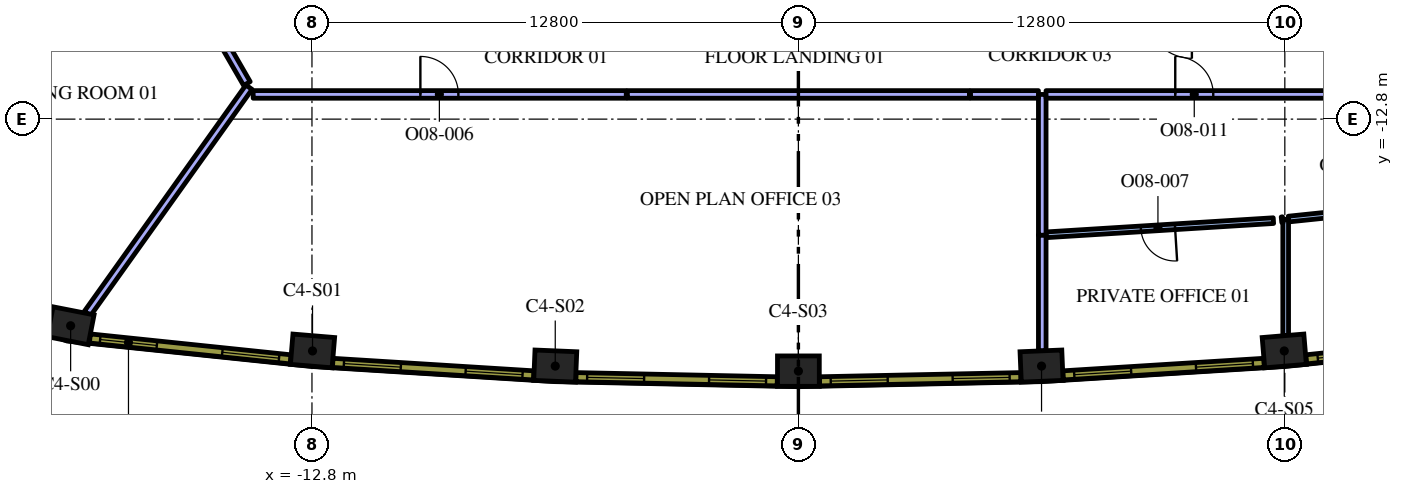
"""IFC4 building model, lengths in metres.
Left out: names, types, materials, properties, quantities, classifications, styles, units other than length and angle.
Written with IfcOpenShell. Run it as: python <this file> out.ifc"""

import sys

from ifc_helpers import new_model, si_unit, direction, frame, frame_2d, origin, origin_2d, place, context, subcontext, project, spatial, rectangle, extrude, element, fill, save


model = new_model("IFC4")
c1 = context("Model", 3, precision=1e-05, world=origin(), true_north=direction((0.0, 1.0)))
c2 = subcontext(c1, "Body", "Model", "MODEL_VIEW")
j1 = project(units=[si_unit("LENGTHUNIT", "METRE"), si_unit("PLANEANGLEUNIT", "RADIAN")], contexts=[c1])
p1 = place(None, origin())
s1 = spatial("IfcSite", under=j1, at=p1, CompositionType="ELEMENT")
p2 = place(p1, origin())
s2 = spatial("IfcBuilding", under=s1, at=p2, CompositionType="ELEMENT")
p3 = place(p2, frame((0.0, 0.0, 226.8)))
s3 = spatial("IfcBuildingStorey", under=s2, at=p3, CompositionType="ELEMENT", Elevation=226.8)
for number, where, z_axis, x_axis in (
    (1, (-19.15, -18.237, 0.0), (0.0, 0.0, 1.0), (0.981, -0.192, 0.0)),
    (2, (-12.785, -18.9, 0.0), (0.0, 0.0, 1.0), (0.997, -0.083, 0.0)),
    (3, (-6.398, -19.298, 0.0), (0.0, 0.0, 1.0), (0.999, -0.041, 0.0)),
    (4, (0.0, -19.431, 0.0), (0.0, 0.0, 1.0), (1.0, 0.0, 0.0)),
    (5, (6.398, -19.298, 0.0), (0.0, 0.0, 1.0), (0.999, 0.041, 0.0)),
    (6, (12.785, -18.9, 0.0), (0.0, 0.0, 1.0), (0.997, 0.083, 0.0)),
):
    element("IfcColumn", number, at=place(p3, frame(where, z_axis=z_axis, x_axis=x_axis)), inside=s3, PredefinedType="COLUMN", context=c2, shape_type="SweptSolid", body=[
        extrude(rectangle(XDim=1.1, YDim=0.8, at=origin_2d()), origin(), (0.0, 0.0, 1.0), 4.2),
    ])
p4 = place(p3, frame((-14.457, -11.96, 0.0), z_axis=(0.0, 0.0, 1.0), x_axis=(-0.581023578026, -0.813886725397, 0.0)))
e7 = element("IfcWall", 7, at=p4, inside=s3, PredefinedType="PARTITIONING", context=c2, shape_type="SweptSolid", body=[
    extrude(rectangle(XDim=7.318, YDim=0.2, at=frame_2d((3.659, 0.0))), origin(), (0.0, 0.0, 1.0), 3.45),
])
p5 = place(p3, frame((-17.531, -6.635, 0.0), z_axis=(0.0, 0.0, 1.0), x_axis=(0.500009459589, -0.866019942219, 0.0)))
e8 = element("IfcWall", 8, at=p5, inside=s3, PredefinedType="PARTITIONING", context=c2, shape_type="SweptSolid", body=[
    extrude(rectangle(XDim=6.038, YDim=0.2, at=frame_2d((3.019, 0.0))), origin(), (0.0, 0.0, 1.0), 3.45),
])
p6 = place(p5, frame((2.5, 0.0, 0.0)))
e9 = element("IfcOpeningElement", 9, at=p6, cuts=e8, PredefinedType="OPENING", context=c2, shape_type="SweptSolid", body=[
    extrude(rectangle(XDim=1.0, YDim=2.1, at=frame_2d((0.5, 1.05))), frame((0.0, 0.11, 0.0), z_axis=(0.0, -1.0, 0.0), x_axis=(1.0, 0.0, 0.0)), (0.0, 0.0, 1.0), 0.22),
])
p7 = place(p3, frame((6.417, -15.846, 0.0), z_axis=(0.0, 0.0, 1.0), x_axis=(0.0, -1.0, 0.0)))
e10 = element("IfcWall", 10, at=p7, inside=s3, PredefinedType="PARTITIONING", context=c2, shape_type="SweptSolid", body=[
    extrude(rectangle(XDim=3.051, YDim=0.2, at=frame_2d((1.525, 0.0))), origin(), (0.0, 0.0, 1.0), 3.45),
])
p8 = place(p3, frame((6.417, -12.15, 0.0), z_axis=(0.0, 0.0, 1.0), x_axis=(0.0, -1.0, 0.0)))
e11 = element("IfcWall", 11, at=p8, inside=s3, PredefinedType="PARTITIONING", context=c2, shape_type="SweptSolid", body=[
    extrude(rectangle(XDim=3.704, YDim=0.2, at=frame_2d((1.852, 0.0))), origin(), (0.0, 0.0, 1.0), 3.45),
])
p9 = place(p3, frame((-4.5, -12.15, 0.0), z_axis=(0.0, 0.0, 1.0), x_axis=(1.0, 0.0, 0.0)))
e12 = element("IfcWall", 12, at=p9, inside=s3, PredefinedType="PARTITIONING", context=c2, shape_type="SweptSolid", body=[
    extrude(rectangle(XDim=9.0, YDim=0.2, at=frame_2d((4.5, 0.0))), origin(), (0.0, 0.0, 1.0), 3.45),
])
p10 = place(p3, frame((-14.347, -12.15, 0.0), z_axis=(0.0, 0.0, 1.0), x_axis=(1.0, 0.0, 0.0)))
e13 = element("IfcWall", 13, at=p10, inside=s3, PredefinedType="PARTITIONING", context=c2, shape_type="SweptSolid", body=[
    extrude(rectangle(XDim=9.817, YDim=0.2, at=frame_2d((4.909, 0.0))), origin(), (0.0, 0.0, 1.0), 3.45),
])
p11 = place(p10, frame((4.4, 0.0, 0.0)))
e14 = element("IfcOpeningElement", 14, at=p11, cuts=e13, PredefinedType="OPENING", context=c2, shape_type="SweptSolid", body=[
    extrude(rectangle(XDim=1.0, YDim=2.1, at=frame_2d((0.5, 1.05))), frame((0.0, 0.11, 0.0), z_axis=(0.0, -1.0, 0.0), x_axis=(1.0, 0.0, 0.0)), (0.0, 0.0, 1.0), 0.22),
])
p12 = place(p3, frame((4.53, -12.15, 0.0), z_axis=(0.0, 0.0, 1.0), x_axis=(1.0, 0.0, 0.0)))
e15 = element("IfcWall", 15, at=p12, inside=s3, PredefinedType="PARTITIONING", context=c2, shape_type="SweptSolid", body=[
    extrude(rectangle(XDim=1.787, YDim=0.2, at=frame_2d((0.894, 0.0))), origin(), (0.0, 0.0, 1.0), 3.45),
])
p13 = place(p3, frame((12.823, -15.437, 0.0), z_axis=(0.0, 0.0, 1.0), x_axis=(0.0, -1.0, 0.0)))
e16 = element("IfcWall", 16, at=p13, inside=s3, PredefinedType="PARTITIONING", context=c2, shape_type="SweptSolid", body=[
    extrude(rectangle(XDim=3.058, YDim=0.15, at=frame_2d((1.529, 0.0))), origin(), (0.0, 0.0, 1.0), 3.45),
])
p14 = place(p3, frame((12.5, -15.471, 0.0), z_axis=(0.0, 0.0, 1.0), x_axis=(-0.998061916726, -0.0622286942, 0.0)))
e17 = element("IfcWall", 17, at=p14, inside=s3, PredefinedType="PARTITIONING", context=c2, shape_type="SweptSolid", body=[
    extrude(rectangle(XDim=5.995, YDim=0.15, at=frame_2d((2.998, 0.0))), origin(), (0.0, 0.0, 1.0), 3.45),
])
p15 = place(p14, frame((2.595, 0.0, 0.0)))
e18 = element("IfcOpeningElement", 18, at=p15, cuts=e17, PredefinedType="OPENING", context=c2, shape_type="SweptSolid", body=[
    extrude(rectangle(XDim=0.9, YDim=2.1, at=frame_2d((0.45, 1.05))), frame((0.0, 0.085, 0.0), z_axis=(0.0, -1.0, 0.0), x_axis=(1.0, 0.0, 0.0)), (0.0, 0.0, 1.0), 0.17),
])
p16 = place(p3, frame((12.713, -15.448, 0.0), z_axis=(0.0, 0.0, 1.0), x_axis=(0.995106821048, 0.098804932586, 0.0)))
e19 = element("IfcWall", 19, at=p16, inside=s3, PredefinedType="PARTITIONING", context=c2, shape_type="SweptSolid", body=[
    extrude(rectangle(XDim=0.035, YDim=0.15, at=frame_2d((0.017, 0.0))), origin(), (0.0, 0.0, 1.0), 3.45),
])
p17 = place(p3, frame((16.569, -15.047, 0.0), z_axis=(0.0, 0.0, 1.0), x_axis=(-0.994621532294, -0.103576095197, 0.0)))
e20 = element("IfcWall", 20, at=p17, inside=s3, PredefinedType="PARTITIONING", context=c2, shape_type="SweptSolid", body=[
    extrude(rectangle(XDim=3.691, YDim=0.15, at=frame_2d((1.846, 0.0))), origin(), (0.0, 0.0, 1.0), 3.45),
])
p18 = place(p17, frame((1.391, 0.0, 0.0)))
e21 = element("IfcOpeningElement", 21, at=p18, cuts=e20, PredefinedType="OPENING", context=c2, shape_type="SweptSolid", body=[
    extrude(rectangle(XDim=0.9, YDim=2.1, at=frame_2d((0.45, 1.05))), frame((0.0, 0.085, 0.0), z_axis=(0.0, -1.0, 0.0), x_axis=(1.0, 0.0, 0.0)), (0.0, 0.0, 1.0), 0.17),
])
p19 = place(p3, frame((6.517, -12.15, 0.0), z_axis=(0.0, 0.0, 1.0), x_axis=(1.0, 0.0, 0.0)))
e22 = element("IfcWall", 22, at=p19, inside=s3, PredefinedType="PARTITIONING", context=c2, shape_type="SweptSolid", body=[
    extrude(rectangle(XDim=7.83, YDim=0.2, at=frame_2d((3.915, 0.0))), origin(), (0.0, 0.0, 1.0), 3.45),
])
p20 = place(p19, frame((3.4, 0.0, 0.0)))
e23 = element("IfcOpeningElement", 23, at=p20, cuts=e22, PredefinedType="OPENING", context=c2, shape_type="SweptSolid", body=[
    extrude(rectangle(XDim=1.0, YDim=2.1, at=frame_2d((0.5, 1.05))), frame((0.0, 0.11, 0.0), z_axis=(0.0, -1.0, 0.0), x_axis=(1.0, 0.0, 0.0)), (0.0, 0.0, 1.0), 0.22),
])
p21 = place(p3, frame((-18.644, -18.571, 0.0), z_axis=(0.0, 0.0, 1.0), x_axis=(0.994621961215, -0.103571976272, 0.0)))
e24 = element("IfcWall", 24, at=p21, inside=s3, PredefinedType="SOLIDWALL", context=c2, shape_type="SweptSolid", body=[
    extrude(rectangle(XDim=5.311, YDim=0.24, at=frame_2d((2.655, 0.0))), origin(), (0.0, 0.0, 1.0), 3.95),
])
p22 = place(p21, frame((0.271, 0.0, 0.9)))
e25 = element("IfcOpeningElement", 25, at=p22, cuts=e24, PredefinedType="OPENING", context=c2, shape_type="SweptSolid", body=[
    extrude(rectangle(XDim=1.5, YDim=2.55, at=frame_2d((0.75, 1.275))), frame((0.0, 0.13, 0.0), z_axis=(0.0, -1.0, 0.0), x_axis=(1.0, 0.0, 0.0)), (0.0, 0.0, 1.0), 0.26),
])
p23 = place(p21, frame((3.504, 0.0, 0.9)))
e26 = element("IfcOpeningElement", 26, at=p23, cuts=e24, PredefinedType="OPENING", context=c2, shape_type="SweptSolid", body=[
    extrude(rectangle(XDim=1.5, YDim=2.55, at=frame_2d((0.75, 1.275))), frame((0.0, 0.13, 0.0), z_axis=(0.0, -1.0, 0.0), x_axis=(1.0, 0.0, 0.0)), (0.0, 0.0, 1.0), 0.26),
])
p24 = place(p3, frame((-12.253, -19.213, 0.0), z_axis=(0.0, 0.0, 1.0), x_axis=(0.9980633213, -0.062206162685, 0.0)))
e27 = element("IfcWall", 27, at=p24, inside=s3, PredefinedType="SOLIDWALL", context=c2, shape_type="SweptSolid", body=[
    extrude(rectangle(XDim=5.298, YDim=0.24, at=frame_2d((2.649, 0.0))), origin(), (0.0, 0.0, 1.0), 3.95),
])
p25 = place(p24, frame((0.294, 0.0, 0.9)))
e28 = element("IfcOpeningElement", 28, at=p25, cuts=e27, PredefinedType="OPENING", context=c2, shape_type="SweptSolid", body=[
    extrude(rectangle(XDim=1.5, YDim=2.55, at=frame_2d((0.75, 1.275))), frame((0.0, 0.13, 0.0), z_axis=(0.0, -1.0, 0.0), x_axis=(1.0, 0.0, 0.0)), (0.0, 0.0, 1.0), 0.26),
])
p26 = place(p24, frame((3.504, 0.0, 0.9)))
e29 = element("IfcOpeningElement", 29, at=p26, cuts=e27, PredefinedType="OPENING", context=c2, shape_type="SweptSolid", body=[
    extrude(rectangle(XDim=1.5, YDim=2.55, at=frame_2d((0.75, 1.275))), frame((0.0, 0.13, 0.0), z_axis=(0.0, -1.0, 0.0), x_axis=(1.0, 0.0, 0.0)), (0.0, 0.0, 1.0), 0.26),
])
p27 = place(p3, frame((-5.854, -19.589, 0.0), z_axis=(0.0, 0.0, 1.0), x_axis=(0.999784035184, -0.020781794712, 0.0)))
e30 = element("IfcWall", 30, at=p27, inside=s3, PredefinedType="SOLIDWALL", context=c2, shape_type="SweptSolid", body=[
    extrude(rectangle(XDim=5.298, YDim=0.24, at=frame_2d((2.649, 0.0))), origin(), (0.0, 0.0, 1.0), 3.95),
])
p28 = place(p27, frame((0.294, 0.0, 0.9)))
e31 = element("IfcOpeningElement", 31, at=p28, cuts=e30, PredefinedType="OPENING", context=c2, shape_type="SweptSolid", body=[
    extrude(rectangle(XDim=1.5, YDim=2.55, at=frame_2d((0.75, 1.275))), frame((0.0, 0.13, 0.0), z_axis=(0.0, -1.0, 0.0), x_axis=(1.0, 0.0, 0.0)), (0.0, 0.0, 1.0), 0.26),
])
p29 = place(p27, frame((3.504, 0.0, 0.9)))
e32 = element("IfcOpeningElement", 32, at=p29, cuts=e30, PredefinedType="OPENING", context=c2, shape_type="SweptSolid", body=[
    extrude(rectangle(XDim=1.5, YDim=2.55, at=frame_2d((0.75, 1.275))), frame((0.0, 0.13, 0.0), z_axis=(0.0, -1.0, 0.0), x_axis=(1.0, 0.0, 0.0)), (0.0, 0.0, 1.0), 0.26),
])
p30 = place(p3, frame((0.556, -19.699, 0.0), z_axis=(0.0, 0.0, 1.0), x_axis=(0.999784035184, 0.020781794712, 0.0)))
e33 = element("IfcWall", 33, at=p30, inside=s3, PredefinedType="SOLIDWALL", context=c2, shape_type="SweptSolid", body=[
    extrude(rectangle(XDim=5.298, YDim=0.24, at=frame_2d((2.649, 0.0))), origin(), (0.0, 0.0, 1.0), 3.95),
])
p31 = place(p30, frame((0.294, 0.0, 0.9)))
e34 = element("IfcOpeningElement", 34, at=p31, cuts=e33, PredefinedType="OPENING", context=c2, shape_type="SweptSolid", body=[
    extrude(rectangle(XDim=1.5, YDim=2.55, at=frame_2d((0.75, 1.275))), frame((0.0, 0.13, 0.0), z_axis=(0.0, -1.0, 0.0), x_axis=(1.0, 0.0, 0.0)), (0.0, 0.0, 1.0), 0.26),
])
p32 = place(p30, frame((3.504, 0.0, 0.9)))
e35 = element("IfcOpeningElement", 35, at=p32, cuts=e33, PredefinedType="OPENING", context=c2, shape_type="SweptSolid", body=[
    extrude(rectangle(XDim=1.5, YDim=2.55, at=frame_2d((0.75, 1.275))), frame((0.0, 0.13, 0.0), z_axis=(0.0, -1.0, 0.0), x_axis=(1.0, 0.0, 0.0)), (0.0, 0.0, 1.0), 0.26),
])
p33 = place(p3, frame((6.965, -19.543, 0.0), z_axis=(0.0, 0.0, 1.0), x_axis=(0.9980633213, 0.062206162685, 0.0)))
e36 = element("IfcWall", 36, at=p33, inside=s3, PredefinedType="SOLIDWALL", context=c2, shape_type="SweptSolid", body=[
    extrude(rectangle(XDim=5.298, YDim=0.24, at=frame_2d((2.649, 0.0))), origin(), (0.0, 0.0, 1.0), 3.95),
])
p34 = place(p33, frame((0.295, 0.0, 0.9)))
e37 = element("IfcOpeningElement", 37, at=p34, cuts=e36, PredefinedType="OPENING", context=c2, shape_type="SweptSolid", body=[
    extrude(rectangle(XDim=1.5, YDim=2.55, at=frame_2d((0.75, 1.275))), frame((0.0, 0.13, 0.0), z_axis=(0.0, -1.0, 0.0), x_axis=(1.0, 0.0, 0.0)), (0.0, 0.0, 1.0), 0.26),
])
p35 = place(p33, frame((3.504, 0.0, 0.9)))
e38 = element("IfcOpeningElement", 38, at=p35, cuts=e36, PredefinedType="OPENING", context=c2, shape_type="SweptSolid", body=[
    extrude(rectangle(XDim=1.5, YDim=2.55, at=frame_2d((0.75, 1.275))), frame((0.0, 0.13, 0.0), z_axis=(0.0, -1.0, 0.0), x_axis=(1.0, 0.0, 0.0)), (0.0, 0.0, 1.0), 0.26),
])
p36 = place(p3, frame((13.362, -19.121, 0.0), z_axis=(0.0, 0.0, 1.0), x_axis=(0.994621961215, 0.103571976272, 0.0)))
e39 = element("IfcWall", 39, at=p36, inside=s3, PredefinedType="SOLIDWALL", context=c2, shape_type="SweptSolid", body=[
    extrude(rectangle(XDim=5.311, YDim=0.24, at=frame_2d((2.655, 0.0))), origin(), (0.0, 0.0, 1.0), 3.95),
])
p37 = place(p36, frame((0.306, 0.0, 0.9)))
e40 = element("IfcOpeningElement", 40, at=p37, cuts=e39, PredefinedType="OPENING", context=c2, shape_type="SweptSolid", body=[
    extrude(rectangle(XDim=1.5, YDim=2.55, at=frame_2d((0.75, 1.275))), frame((0.0, 0.13, 0.0), z_axis=(0.0, -1.0, 0.0), x_axis=(1.0, 0.0, 0.0)), (0.0, 0.0, 1.0), 0.26),
])
p38 = place(p36, frame((3.539, 0.0, 0.9)))
e41 = element("IfcOpeningElement", 41, at=p38, cuts=e39, PredefinedType="OPENING", context=c2, shape_type="SweptSolid", body=[
    extrude(rectangle(XDim=1.5, YDim=2.55, at=frame_2d((0.75, 1.275))), frame((0.0, 0.13, 0.0), z_axis=(0.0, -1.0, 0.0), x_axis=(1.0, 0.0, 0.0)), (0.0, 0.0, 1.0), 0.26),
])
p39 = place(p11, origin())
e42 = element("IfcDoor", 42, at=p39, inside=s3, OperationType="SINGLE_SWING_LEFT", PredefinedType="DOOR", context=c2, shape_type="SweptSolid", body=[
    extrude(rectangle(XDim=1.0, YDim=2.1, at=frame_2d((0.5, 1.05))), frame((0.0, 0.025, 0.0), z_axis=(0.0, -1.0, 0.0), x_axis=(1.0, 0.0, 0.0)), (0.0, 0.0, 1.0), 0.05),
])
fill(e14, e42)
p40 = place(p15, origin())
e43 = element("IfcDoor", 43, at=p40, inside=s3, OperationType="SINGLE_SWING_RIGHT", PredefinedType="DOOR", context=c2, shape_type="SweptSolid", body=[
    extrude(rectangle(XDim=0.9, YDim=2.1, at=frame_2d((0.45, 1.05))), frame((0.0, 0.025, 0.0), z_axis=(0.0, -1.0, 0.0), x_axis=(1.0, 0.0, 0.0)), (0.0, 0.0, 1.0), 0.05),
])
fill(e18, e43)
p41 = place(p20, origin())
e44 = element("IfcDoor", 44, at=p41, inside=s3, OperationType="SINGLE_SWING_LEFT", PredefinedType="DOOR", context=c2, shape_type="SweptSolid", body=[
    extrude(rectangle(XDim=1.0, YDim=2.1, at=frame_2d((0.5, 1.05))), frame((0.0, 0.025, 0.0), z_axis=(0.0, -1.0, 0.0), x_axis=(1.0, 0.0, 0.0)), (0.0, 0.0, 1.0), 0.05),
])
fill(e23, e44)
p42 = place(p22, origin())
e45 = element("IfcWindow", 45, at=p42, inside=s3, PartitioningType="SINGLE_PANEL", PredefinedType="WINDOW", context=c2, shape_type="SweptSolid", body=[
    extrude(rectangle(XDim=1.5, YDim=2.55, at=frame_2d((0.75, 1.275))), frame((0.0, 0.04, 0.0), z_axis=(0.0, -1.0, 0.0), x_axis=(1.0, 0.0, 0.0)), (0.0, 0.0, 1.0), 0.06),
])
fill(e25, e45)
p43 = place(p23, origin())
e46 = element("IfcWindow", 46, at=p43, inside=s3, PartitioningType="SINGLE_PANEL", PredefinedType="WINDOW", context=c2, shape_type="SweptSolid", body=[
    extrude(rectangle(XDim=1.5, YDim=2.55, at=frame_2d((0.75, 1.275))), frame((0.0, 0.04, 0.0), z_axis=(0.0, -1.0, 0.0), x_axis=(1.0, 0.0, 0.0)), (0.0, 0.0, 1.0), 0.06),
])
fill(e26, e46)
p44 = place(p25, origin())
e47 = element("IfcWindow", 47, at=p44, inside=s3, PartitioningType="SINGLE_PANEL", PredefinedType="WINDOW", context=c2, shape_type="SweptSolid", body=[
    extrude(rectangle(XDim=1.5, YDim=2.55, at=frame_2d((0.75, 1.275))), frame((0.0, 0.04, 0.0), z_axis=(0.0, -1.0, 0.0), x_axis=(1.0, 0.0, 0.0)), (0.0, 0.0, 1.0), 0.06),
])
fill(e28, e47)
p45 = place(p26, origin())
e48 = element("IfcWindow", 48, at=p45, inside=s3, PartitioningType="SINGLE_PANEL", PredefinedType="WINDOW", context=c2, shape_type="SweptSolid", body=[
    extrude(rectangle(XDim=1.5, YDim=2.55, at=frame_2d((0.75, 1.275))), frame((0.0, 0.04, 0.0), z_axis=(0.0, -1.0, 0.0), x_axis=(1.0, 0.0, 0.0)), (0.0, 0.0, 1.0), 0.06),
])
fill(e29, e48)
p46 = place(p28, origin())
e49 = element("IfcWindow", 49, at=p46, inside=s3, PartitioningType="SINGLE_PANEL", PredefinedType="WINDOW", context=c2, shape_type="SweptSolid", body=[
    extrude(rectangle(XDim=1.5, YDim=2.55, at=frame_2d((0.75, 1.275))), frame((0.0, 0.04, 0.0), z_axis=(0.0, -1.0, 0.0), x_axis=(1.0, 0.0, 0.0)), (0.0, 0.0, 1.0), 0.06),
])
fill(e31, e49)
p47 = place(p29, origin())
e50 = element("IfcWindow", 50, at=p47, inside=s3, PartitioningType="SINGLE_PANEL", PredefinedType="WINDOW", context=c2, shape_type="SweptSolid", body=[
    extrude(rectangle(XDim=1.5, YDim=2.55, at=frame_2d((0.75, 1.275))), frame((0.0, 0.04, 0.0), z_axis=(0.0, -1.0, 0.0), x_axis=(1.0, 0.0, 0.0)), (0.0, 0.0, 1.0), 0.06),
])
fill(e32, e50)
p48 = place(p31, origin())
e51 = element("IfcWindow", 51, at=p48, inside=s3, PartitioningType="SINGLE_PANEL", PredefinedType="WINDOW", context=c2, shape_type="SweptSolid", body=[
    extrude(rectangle(XDim=1.5, YDim=2.55, at=frame_2d((0.75, 1.275))), frame((0.0, 0.04, 0.0), z_axis=(0.0, -1.0, 0.0), x_axis=(1.0, 0.0, 0.0)), (0.0, 0.0, 1.0), 0.06),
])
fill(e34, e51)
p49 = place(p32, origin())
e52 = element("IfcWindow", 52, at=p49, inside=s3, PartitioningType="SINGLE_PANEL", PredefinedType="WINDOW", context=c2, shape_type="SweptSolid", body=[
    extrude(rectangle(XDim=1.5, YDim=2.55, at=frame_2d((0.75, 1.275))), frame((0.0, 0.04, 0.0), z_axis=(0.0, -1.0, 0.0), x_axis=(1.0, 0.0, 0.0)), (0.0, 0.0, 1.0), 0.06),
])
fill(e35, e52)
p50 = place(p34, origin())
e53 = element("IfcWindow", 53, at=p50, inside=s3, PartitioningType="SINGLE_PANEL", PredefinedType="WINDOW", context=c2, shape_type="SweptSolid", body=[
    extrude(rectangle(XDim=1.5, YDim=2.55, at=frame_2d((0.75, 1.275))), frame((0.0, 0.04, 0.0), z_axis=(0.0, -1.0, 0.0), x_axis=(1.0, 0.0, 0.0)), (0.0, 0.0, 1.0), 0.06),
])
fill(e37, e53)
p51 = place(p35, origin())
e54 = element("IfcWindow", 54, at=p51, inside=s3, PartitioningType="SINGLE_PANEL", PredefinedType="WINDOW", context=c2, shape_type="SweptSolid", body=[
    extrude(rectangle(XDim=1.5, YDim=2.55, at=frame_2d((0.75, 1.275))), frame((0.0, 0.04, 0.0), z_axis=(0.0, -1.0, 0.0), x_axis=(1.0, 0.0, 0.0)), (0.0, 0.0, 1.0), 0.06),
])
fill(e38, e54)
p52 = place(p37, origin())
e55 = element("IfcWindow", 55, at=p52, inside=s3, PartitioningType="SINGLE_PANEL", PredefinedType="WINDOW", context=c2, shape_type="SweptSolid", body=[
    extrude(rectangle(XDim=1.5, YDim=2.55, at=frame_2d((0.75, 1.275))), frame((0.0, 0.04, 0.0), z_axis=(0.0, -1.0, 0.0), x_axis=(1.0, 0.0, 0.0)), (0.0, 0.0, 1.0), 0.06),
])
fill(e40, e55)
save(model, sys.argv[1])
